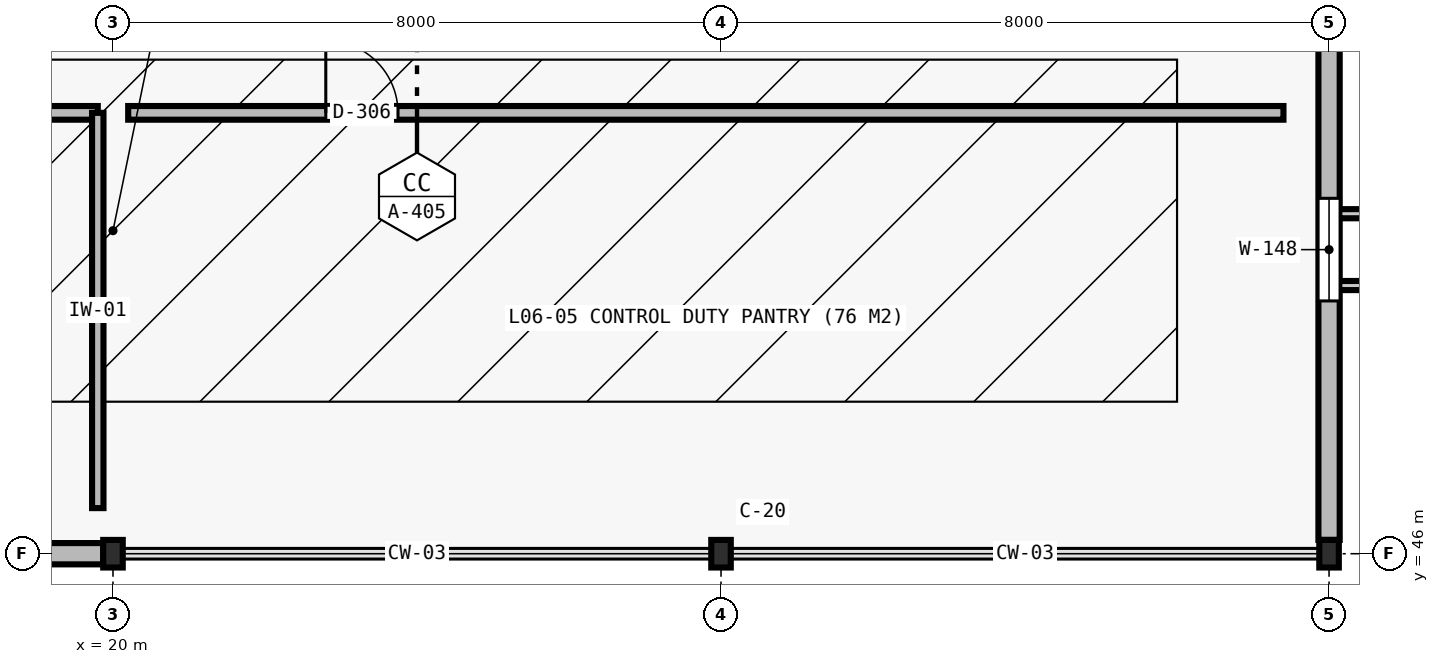
"""IFC4 building model, lengths in metres.
Left out: names, types, materials, properties, quantities, classifications, styles, units other than length and angle.
Written with IfcOpenShell. Run it as: python <this file> out.ifc"""

import sys

from ifc_helpers import new_model, si_unit, direction, frame, frame_2d, origin, origin_2d, place, context, subcontext, project, spatial, rectangle, i_section, extrude, element, fill, save


model = new_model("IFC4")
c1 = context("Model", 3, precision=1e-05, world=origin(), true_north=direction((0.0, 1.0)))
c2 = subcontext(c1, "Body", "Model", "MODEL_VIEW")
j1 = project(units=[si_unit("LENGTHUNIT", "METRE"), si_unit("PLANEANGLEUNIT", "RADIAN")], contexts=[c1])
p1 = place(None, origin())
s1 = spatial("IfcSite", under=j1, at=p1, CompositionType="ELEMENT")
p2 = place(p1, origin())
s2 = spatial("IfcBuilding", under=s1, at=p2, CompositionType="ELEMENT")
p3 = place(p2, frame((0.0, 0.0, 28.0)))
s3 = spatial("IfcBuildingStorey", under=s2, at=p3, CompositionType="ELEMENT", Elevation=28.0)
for number, where, z_axis, x_axis in (
    (1, (20.0, 46.0, 0.0), (0.0, 0.0, 1.0), (1.0, 0.0, 0.0)),
    (2, (28.0, 46.0, 0.0), (0.0, 0.0, 1.0), (1.0, 0.0, 0.0)),
    (3, (36.0, 46.0, 0.0), (0.0, 0.0, 1.0), (1.0, 0.0, 0.0)),
):
    element("IfcColumn", number, at=place(p3, frame(where, z_axis=z_axis, x_axis=x_axis)), inside=s3, PredefinedType="COLUMN", context=c2, shape_type="SweptSolid", body=[
        extrude(i_section(OverallWidth=0.257, OverallDepth=0.363, WebThickness=0.013, FlangeThickness=0.022, at=origin_2d()), origin(), (0.0, 0.0, 1.0), 3.98),
    ])
p4 = place(p3, frame((19.872, 46.0, 0.0), z_axis=(0.0, 0.0, 1.0), x_axis=(-1.0, 0.0, 0.0)))
e4 = element("IfcWall", 4, at=p4, inside=s3, PredefinedType="STANDARD", context=c2, shape_type="SweptSolid", body=[
    extrude(rectangle(XDim=7.743, YDim=0.28, at=frame_2d((3.872, 0.0))), origin(), (0.0, 0.0, 1.0), 3.52),
])
p5 = place(p4, frame((3.197, 0.0, 0.95)))
e5 = element("IfcOpeningElement", 5, at=p5, cuts=e4, PredefinedType="OPENING", context=c2, shape_type="SweptSolid", body=[
    extrude(rectangle(XDim=1.35, YDim=2.05, at=frame_2d((0.675, 1.025))), frame((0.0, 0.15, 0.0), z_axis=(0.0, -1.0, 0.0), x_axis=(1.0, 0.0, 0.0)), (0.0, 0.0, 1.0), 0.3),
])
p6 = place(p3, frame((36.0, 53.82, 0.0), z_axis=(0.0, 0.0, 1.0), x_axis=(0.0, -1.0, 0.0)))
e6 = element("IfcWall", 6, at=p6, inside=s3, PredefinedType="STANDARD", context=c2, shape_type="SweptSolid", body=[
    extrude(rectangle(XDim=7.639, YDim=0.28, at=frame_2d((3.819, 0.0))), origin(), (0.0, 0.0, 1.0), 3.52),
])
p7 = place(p6, frame((3.144, 0.0, 0.95)))
e7 = element("IfcOpeningElement", 7, at=p7, cuts=e6, PredefinedType="OPENING", context=c2, shape_type="SweptSolid", body=[
    extrude(rectangle(XDim=1.35, YDim=2.05, at=frame_2d((0.675, 1.025))), frame((0.0, 0.15, 0.0), z_axis=(0.0, -1.0, 0.0), x_axis=(1.0, 0.0, 0.0)), (0.0, 0.0, 1.0), 0.3),
])
p8 = place(p3, frame((6.4, 51.8, 0.0), z_axis=(0.0, 0.0, 1.0), x_axis=(1.0, 0.0, 0.0)))
e8 = element("IfcWall", 8, at=p8, inside=s3, PredefinedType="PARTITIONING", context=c2, shape_type="SweptSolid", body=[
    extrude(rectangle(XDim=13.4, YDim=0.18, at=frame_2d((6.7, 0.0))), origin(), (0.0, 0.0, 1.0), 3.98),
])
p9 = place(p8, frame((2.6, 0.0, 0.0)))
e9 = element("IfcOpeningElement", 9, at=p9, cuts=e8, PredefinedType="OPENING", context=c2, shape_type="SweptSolid", body=[
    extrude(rectangle(XDim=0.95, YDim=2.1, at=frame_2d((0.475, 1.05))), frame((0.0, 0.1, 0.0), z_axis=(0.0, -1.0, 0.0), x_axis=(1.0, 0.0, 0.0)), (0.0, 0.0, 1.0), 0.2),
])
p10 = place(p3, frame((19.8, 46.6, 0.0), z_axis=(0.0, 0.0, 1.0), x_axis=(0.0, 1.0, 0.0)))
e10 = element("IfcWall", 10, at=p10, inside=s3, PredefinedType="PARTITIONING", context=c2, shape_type="SweptSolid", body=[
    extrude(rectangle(XDim=5.2, YDim=0.15, at=frame_2d((2.6, 0.0))), origin(), (0.0, 0.0, 1.0), 3.98),
])
p11 = place(p3, frame((20.2, 51.8, 0.0), z_axis=(0.0, 0.0, 1.0), x_axis=(1.0, 0.0, 0.0)))
e11 = element("IfcWall", 11, at=p11, inside=s3, PredefinedType="PARTITIONING", context=c2, shape_type="SweptSolid", body=[
    extrude(rectangle(XDim=15.2, YDim=0.18, at=frame_2d((7.6, 0.0))), origin(), (0.0, 0.0, 1.0), 3.98),
])
p12 = place(p11, frame((2.6, 0.0, 0.0)))
e12 = element("IfcOpeningElement", 12, at=p12, cuts=e11, PredefinedType="OPENING", context=c2, shape_type="SweptSolid", body=[
    extrude(rectangle(XDim=0.95, YDim=2.1, at=frame_2d((0.475, 1.05))), frame((0.0, 0.1, 0.0), z_axis=(0.0, -1.0, 0.0), x_axis=(1.0, 0.0, 0.0)), (0.0, 0.0, 1.0), 0.2),
])
p13 = place(p7, origin())
e13 = element("IfcWindow", 13, at=p13, inside=s3, PartitioningType="SINGLE_PANEL", PredefinedType="WINDOW", context=c2, shape_type="SweptSolid", body=[
    extrude(rectangle(XDim=1.35, YDim=2.05, at=frame_2d((0.675, 1.025))), frame((0.0, 0.03, 0.0), z_axis=(0.0, -1.0, 0.0), x_axis=(1.0, 0.0, 0.0)), (0.0, 0.0, 1.0), 0.06),
])
fill(e7, e13)
p14 = place(p12, origin())
e14 = element("IfcDoor", 14, at=p14, inside=s3, OperationType="SINGLE_SWING_LEFT", PredefinedType="DOOR", context=c2, shape_type="SweptSolid", body=[
    extrude(rectangle(XDim=0.95, YDim=2.1, at=frame_2d((0.475, 1.05))), frame((0.0, 0.025, 0.0), z_axis=(0.0, -1.0, 0.0), x_axis=(1.0, 0.0, 0.0)), (0.0, 0.0, 1.0), 0.05),
])
fill(e12, e14)
save(model, sys.argv[1])
